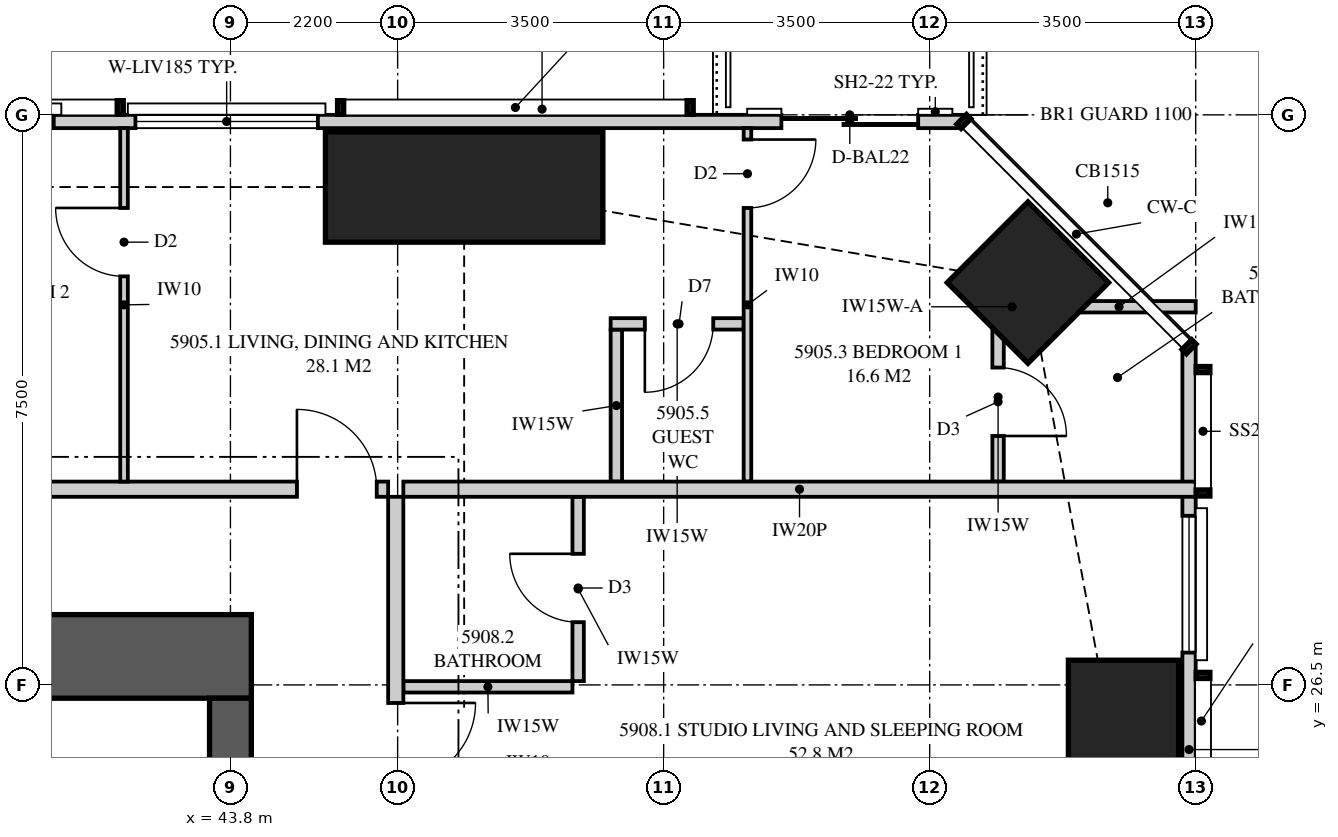
"""IFC4 building model, lengths in metres.
Left out: names, types, materials, properties, quantities, classifications, styles, units other than length and angle.
Written with IfcOpenShell. Run it as: python <this file> out.ifc"""

import sys

from ifc_helpers import new_model, si_unit, direction, frame, frame_2d, origin, origin_2d, place, context, subcontext, project, spatial, polyline, rectangle, hollow_rectangle, outline, extrude, element, fill, save


model = new_model("IFC4")
c1 = context("Model", 3, precision=1e-05, world=origin(), true_north=direction((0.0, 1.0)))
c2 = subcontext(c1, "Body", "Model", "MODEL_VIEW")
j1 = project(units=[si_unit("LENGTHUNIT", "METRE"), si_unit("PLANEANGLEUNIT", "RADIAN")], contexts=[c1])
p1 = place(None, origin())
s1 = spatial("IfcSite", under=j1, at=p1, CompositionType="ELEMENT")
p2 = place(p1, origin())
s2 = spatial("IfcBuilding", under=s1, at=p2, CompositionType="ELEMENT")
p3 = place(p2, frame((0.0, 0.0, 217.95)))
s3 = spatial("IfcBuildingStorey", under=s2, at=p3, CompositionType="ELEMENT", Elevation=217.95)
p4 = place(p3, frame((55.55, 25.0, 0.0), z_axis=(0.0, 0.0, 1.0), x_axis=(1.0, 0.0, 0.0)))
e1 = element("IfcColumn", 1, at=p4, inside=s3, PredefinedType="COLUMN", context=c2, shape_type="SweptSolid", body=[
    extrude(rectangle(XDim=1.45, YDim=3.65, at=origin_2d()), origin(), (0.0, 0.0, 1.0), 3.5),
])
p5 = place(p3, frame((54.293, 31.793, 0.0), z_axis=(0.0, 0.0, 1.0), x_axis=(-0.707106781187, -0.707106781187, 0.0)))
e2 = element("IfcColumn", 2, at=p5, inside=s3, PredefinedType="COLUMN", context=c2, shape_type="SweptSolid", body=[
    extrude(hollow_rectangle(XDim=1.5, YDim=1.5, WallThickness=0.125, at=origin_2d()), origin(), (0.0, 0.0, 1.0), 3.5),
])
p6 = place(p3, frame((46.875, 33.05, 0.0), z_axis=(0.0, 0.0, 1.0), x_axis=(0.0, 1.0, 0.0)))
e3 = element("IfcColumn", 3, at=p6, inside=s3, PredefinedType="COLUMN", context=c2, shape_type="SweptSolid", body=[
    extrude(rectangle(XDim=1.45, YDim=3.65, at=origin_2d()), origin(), (0.0, 0.0, 1.0), 3.5),
])
p7 = place(p3, frame((44.075, 26.875, 0.0), z_axis=(0.0, 0.0, 1.0), x_axis=(-1.0, 0.0, 0.0)))
e4 = element("IfcWall", 4, at=p7, inside=s3, PredefinedType="SHEAR", context=c2, shape_type="SweptSolid", body=[
    extrude(rectangle(XDim=8.175, YDim=1.1, at=frame_2d((4.087, 0.0))), origin(), (0.0, 0.0, 1.0), 3.5),
])
p8 = place(p7, frame((5.575, 0.0, 0.0)))
e5 = element("IfcOpeningElement", 5, at=p8, cuts=e4, PredefinedType="OPENING", context=c2, shape_type="SweptSolid", body=[
    extrude(rectangle(XDim=0.9, YDim=2.1, at=frame_2d((0.45, 1.05))), frame((0.0, 0.56, 0.0), z_axis=(0.0, -1.0, 0.0), x_axis=(1.0, 0.0, 0.0)), (0.0, 0.0, 1.0), 1.12),
])
p9 = place(p3, frame((43.8, 19.3, 0.0), z_axis=(0.0, 0.0, 1.0), x_axis=(0.0, 1.0, 0.0)))
e6 = element("IfcWall", 6, at=p9, inside=s3, PredefinedType="SHEAR", context=c2, shape_type="SweptSolid", body=[
    extrude(rectangle(XDim=7.025, YDim=0.55, at=frame_2d((3.512, 0.0))), origin(), (0.0, 0.0, 1.0), 3.5),
])
p10 = place(p3, frame((56.413, 20.35, 0.0), z_axis=(0.0, 0.0, 1.0), x_axis=(0.0, 1.0, 0.0)))
e7 = element("IfcWall", 7, at=p10, inside=s3, PredefinedType="SOLIDWALL", context=c2, shape_type="SweptSolid", body=[
    extrude(outline(polyline([(0.0, 0.0), (10.599, 0.0), (10.599, 3.26), (4.858, 3.26), (4.858, 2.3), (4.793, 2.3), (4.793, 3.26), (4.65, 3.26), (4.65, 2.3), (0.0, 2.3), (0.0, 0.0)])), frame((0.0, 0.087, 0.0), z_axis=(0.0, -1.0, 0.0), x_axis=(1.0, 0.0, 0.0)), (0.0, 0.0, 1.0), 0.175),
])
p11 = place(p10, frame((6.575, 0.0, 0.4)))
e8 = element("IfcOpeningElement", 8, at=p11, cuts=e7, PredefinedType="OPENING", context=c2, shape_type="SweptSolid", body=[
    extrude(rectangle(XDim=1.8, YDim=1.85, at=frame_2d((0.9, 0.925))), frame((0.0, 0.097, 0.0), z_axis=(0.0, -1.0, 0.0), x_axis=(1.0, 0.0, 0.0)), (0.0, 0.0, 1.0), 0.195),
])
p12 = place(p3, frame((53.449, 33.913, 0.0), z_axis=(0.0, 0.0, 1.0), x_axis=(-1.0, 0.0, 0.0)))
e9 = element("IfcWall", 9, at=p12, inside=s3, PredefinedType="SOLIDWALL", context=c2, shape_type="SweptSolid", body=[
    extrude(outline(polyline([(33.597, 0.0), (33.597, 3.26), (26.039, 3.26), (26.039, 2.3), (25.955, 2.3), (25.955, 3.26), (25.824, 3.26), (25.824, 2.3), (6.574, 2.3), (6.574, 3.26), (6.442, 3.26), (6.442, 2.3), (6.359, 2.3), (6.359, 3.26), (0.0, 3.26), (0.0, 0.0), (6.558, 0.0), (6.558, 0.159), (6.838, 0.302), (6.911, 0.302), (7.065, 0.0), (16.226, 0.0), (16.226, 0.178), (16.498, 0.331), (16.553, 0.331), (16.738, 0.0), (25.889, 0.0), (25.889, 0.201), (26.146, 0.358), (26.189, 0.358), (26.408, 0.0), (33.597, 0.0)])), frame((0.0, 0.087, 0.0), z_axis=(0.0, -1.0, 0.0), x_axis=(1.0, 0.0, 0.0)), (0.0, 0.0, 1.0), 0.175),
])
p13 = place(p12, frame((0.6, 0.0, 0.0)))
e10 = element("IfcOpeningElement", 10, at=p13, cuts=e9, PredefinedType="OPENING", context=c2, shape_type="SweptSolid", body=[
    extrude(rectangle(XDim=1.8, YDim=2.25, at=frame_2d((0.9, 1.125))), frame((0.0, 0.097, 0.0), z_axis=(0.0, -1.0, 0.0), x_axis=(1.0, 0.0, 0.0)), (0.0, 0.0, 1.0), 0.195),
])
p14 = place(p12, frame((8.499, 0.0, 0.4)))
e11 = element("IfcOpeningElement", 11, at=p14, cuts=e9, PredefinedType="OPENING", context=c2, shape_type="SweptSolid", body=[
    extrude(rectangle(XDim=2.4, YDim=1.85, at=frame_2d((1.2, 0.925))), frame((0.0, 0.097, 0.0), z_axis=(0.0, -1.0, 0.0), x_axis=(1.0, 0.0, 0.0)), (0.0, 0.0, 1.0), 0.195),
])
p15 = place(p12, frame((11.974, 0.0, 0.4)))
e12 = element("IfcOpeningElement", 12, at=p15, cuts=e9, PredefinedType="OPENING", context=c2, shape_type="SweptSolid", body=[
    extrude(rectangle(XDim=1.8, YDim=1.85, at=frame_2d((0.9, 0.925))), frame((0.0, 0.097, 0.0), z_axis=(0.0, -1.0, 0.0), x_axis=(1.0, 0.0, 0.0)), (0.0, 0.0, 1.0), 0.195),
])
p16 = place(p12, frame((18.124, 0.0, 0.4)))
e13 = element("IfcOpeningElement", 13, at=p16, cuts=e9, PredefinedType="OPENING", context=c2, shape_type="SweptSolid", body=[
    extrude(rectangle(XDim=1.8, YDim=1.85, at=frame_2d((0.9, 0.925))), frame((0.0, 0.097, 0.0), z_axis=(0.0, -1.0, 0.0), x_axis=(1.0, 0.0, 0.0)), (0.0, 0.0, 1.0), 0.195),
])
p17 = place(p12, frame((21.249, 0.0, 0.4)))
e14 = element("IfcOpeningElement", 14, at=p17, cuts=e9, PredefinedType="OPENING", context=c2, shape_type="SweptSolid", body=[
    extrude(rectangle(XDim=1.8, YDim=1.85, at=frame_2d((0.9, 0.925))), frame((0.0, 0.097, 0.0), z_axis=(0.0, -1.0, 0.0), x_axis=(1.0, 0.0, 0.0)), (0.0, 0.0, 1.0), 0.195),
])
p18 = place(p12, frame((27.76, 0.0, 0.4)))
e15 = element("IfcOpeningElement", 15, at=p18, cuts=e9, PredefinedType="OPENING", context=c2, shape_type="SweptSolid", body=[
    extrude(rectangle(XDim=2.4, YDim=1.85, at=frame_2d((1.2, 0.925))), frame((0.0, 0.097, 0.0), z_axis=(0.0, -1.0, 0.0), x_axis=(1.0, 0.0, 0.0)), (0.0, 0.0, 1.0), 0.195),
])
p19 = place(p3, frame((38.8, 29.075, 0.0), z_axis=(0.0, 0.0, 1.0), x_axis=(1.0, 0.0, 0.0)))
e16 = element("IfcWall", 16, at=p19, inside=s3, PredefinedType="PARTITIONING", context=c2, shape_type="SweptSolid", body=[
    extrude(outline(polyline([(0.0, 0.0), (7.075, 0.0), (7.075, 3.26), (7.075, 2.66), (6.765, 2.66), (6.765, 3.26), (0.0, 3.26), (0.0, 0.0)])), frame((0.0, 0.1, 0.0), z_axis=(0.0, -1.0, 0.0), x_axis=(1.0, 0.0, 0.0)), (0.0, 0.0, 1.0), 0.2),
])
p20 = place(p19, frame((5.875, 0.0, 0.0)))
e17 = element("IfcOpeningElement", 17, at=p20, cuts=e16, PredefinedType="OPENING", context=c2, shape_type="SweptSolid", body=[
    extrude(rectangle(XDim=1.05, YDim=2.2, at=frame_2d((0.525, 1.1))), frame((0.0, 0.11, 0.0), z_axis=(0.0, -1.0, 0.0), x_axis=(1.0, 0.0, 0.0)), (0.0, 0.0, 1.0), 0.22),
])
p21 = place(p3, frame((53.975, 31.475, 0.0), z_axis=(0.0, 0.0, 1.0), x_axis=(1.0, 0.0, 0.0)))
e18 = element("IfcWall", 18, at=p21, inside=s3, PredefinedType="PLUMBINGWALL", context=c2, shape_type="SweptSolid", body=[
    extrude(outline(polyline([(0.217, 2.3), (0.0, 2.3), (0.0, 0.521), (0.217, 0.442), (0.217, 2.3)])), frame((0.0, 0.075, 0.0), z_axis=(0.0, -1.0, 0.0), x_axis=(1.0, 0.0, 0.0)), (0.0, 0.0, 1.0), 0.15),
])
p22 = place(p3, frame((54.482, 31.475, 0.0), z_axis=(0.0, 0.0, 1.0), x_axis=(1.0, 0.0, 0.0)))
e19 = element("IfcWall", 19, at=p22, inside=s3, PredefinedType="PLUMBINGWALL", context=c2, shape_type="SweptSolid", body=[
    extrude(outline(polyline([(0.77, 3.26), (0.77, 2.3), (0.412, 2.3), (0.397, 2.214), (0.0, 1.075), (0.295, 0.229), (0.815, 0.04), (0.815, 0.0), (2.018, 0.0), (2.018, 3.26), (0.77, 3.26)])), frame((0.0, 0.075, 0.0), z_axis=(0.0, -1.0, 0.0), x_axis=(1.0, 0.0, 0.0)), (0.0, 0.0, 1.0), 0.15),
])
p23 = place(p3, frame((53.9, 31.4, 0.0), z_axis=(0.0, 0.0, 1.0), x_axis=(0.0, -1.0, 0.0)))
e20 = element("IfcWall", 20, at=p23, inside=s3, PredefinedType="PLUMBINGWALL", context=c2, shape_type="SweptSolid", body=[
    extrude(outline(polyline([(2.225, 2.3), (0.0, 2.3), (0.0, 0.548), (0.199, 0.51), (0.355, 0.425), (0.418, 0.0), (2.225, 0.0), (2.225, 2.3)])), frame((0.0, 0.075, 0.0), z_axis=(0.0, -1.0, 0.0), x_axis=(1.0, 0.0, 0.0)), (0.0, 0.0, 1.0), 0.15),
])
p24 = place(p23, frame((0.725, 0.0, 0.0)))
e21 = element("IfcOpeningElement", 21, at=p24, cuts=e20, PredefinedType="OPENING", context=c2, shape_type="SweptSolid", body=[
    extrude(rectangle(XDim=0.9, YDim=2.1, at=frame_2d((0.45, 1.05))), frame((0.0, 0.085, 0.0), z_axis=(0.0, -1.0, 0.0), x_axis=(1.0, 0.0, 0.0)), (0.0, 0.0, 1.0), 0.17),
])
p25 = place(p3, frame((50.603, 33.825, 0.0), z_axis=(0.0, 0.0, 1.0), x_axis=(0.0, -1.0, 0.0)))
e22 = element("IfcWall", 22, at=p25, inside=s3, PredefinedType="PARTITIONING", context=c2, shape_type="SweptSolid", body=[
    extrude(outline(polyline([(0.0, 0.0), (4.65, 0.0), (4.65, 3.26), (2.279, 3.26), (2.279, 2.3), (0.534, 2.3), (0.534, 3.26), (0.0, 3.26), (0.0, 0.0)])), frame((0.0, 0.05, 0.0), z_axis=(0.0, -1.0, 0.0), x_axis=(1.0, 0.0, 0.0)), (0.0, 0.0, 1.0), 0.1),
])
p26 = place(p25, frame((0.15, 0.0, 0.0)))
e23 = element("IfcOpeningElement", 23, at=p26, cuts=e22, PredefinedType="OPENING", context=c2, shape_type="SweptSolid", body=[
    extrude(rectangle(XDim=0.9, YDim=2.1, at=frame_2d((0.45, 1.05))), frame((0.0, 0.06, 0.0), z_axis=(0.0, -1.0, 0.0), x_axis=(1.0, 0.0, 0.0)), (0.0, 0.0, 1.0), 0.12),
])
p27 = place(p3, frame((42.4, 33.825, 0.0), z_axis=(0.0, 0.0, 1.0), x_axis=(0.0, -1.0, 0.0)))
e24 = element("IfcWall", 24, at=p27, inside=s3, PredefinedType="PARTITIONING", context=c2, shape_type="SweptSolid", body=[
    extrude(outline(polyline([(0.0, 0.0), (4.65, 0.0), (4.65, 3.26), (1.635, 3.26), (1.635, 2.3), (0.0, 2.3), (0.0, 3.26), (0.0, 0.0)])), frame((0.0, 0.05, 0.0), z_axis=(0.0, -1.0, 0.0), x_axis=(1.0, 0.0, 0.0)), (0.0, 0.0, 1.0), 0.1),
])
p28 = place(p27, frame((1.05, 0.0, 0.0)))
e25 = element("IfcOpeningElement", 25, at=p28, cuts=e24, PredefinedType="OPENING", context=c2, shape_type="SweptSolid", body=[
    extrude(rectangle(XDim=0.9, YDim=2.1, at=frame_2d((0.45, 1.05))), frame((0.0, 0.06, 0.0), z_axis=(0.0, -1.0, 0.0), x_axis=(1.0, 0.0, 0.0)), (0.0, 0.0, 1.0), 0.12),
])
p29 = place(p3, frame((46.075, 29.075, 0.0), z_axis=(0.0, 0.0, 1.0), x_axis=(1.0, 0.0, 0.0)))
e26 = element("IfcWall", 26, at=p29, inside=s3, PredefinedType="PARTITIONING", context=c2, shape_type="SweptSolid", body=[
    extrude(outline(polyline([(0.0, 0.0), (10.425, 0.0), (10.425, 3.26), (9.646, 3.26), (9.646, 2.3), (7.795, 2.3), (7.795, 3.26), (2.11, 3.26), (2.11, 2.66), (0.0, 2.66), (0.0, 3.26), (0.0, 0.0)])), frame((0.0, 0.1, 0.0), z_axis=(0.0, -1.0, 0.0), x_axis=(1.0, 0.0, 0.0)), (0.0, 0.0, 1.0), 0.2),
])
p30 = place(p3, frame((45.975, 25.0, 0.0), z_axis=(0.0, 0.0, 1.0), x_axis=(0.0, 1.0, 0.0)))
e27 = element("IfcWall", 27, at=p30, inside=s3, PredefinedType="PARTITIONING", context=c2, shape_type="SweptSolid", body=[
    extrude(rectangle(XDim=3.975, YDim=0.2, at=frame_2d((1.988, 0.0))), origin(), (0.0, 0.0, 1.0), 2.66),
])
p31 = place(p30, frame((0.212, 0.0, 0.0)))
e28 = element("IfcOpeningElement", 28, at=p31, cuts=e27, PredefinedType="OPENING", context=c2, shape_type="SweptSolid", body=[
    extrude(rectangle(XDim=1.05, YDim=2.2, at=frame_2d((0.525, 1.1))), frame((0.0, 0.11, 0.0), z_axis=(0.0, -1.0, 0.0), x_axis=(1.0, 0.0, 0.0)), (0.0, 0.0, 1.0), 0.22),
])
p32 = place(p3, frame((48.375, 26.55, 0.0), z_axis=(0.0, 0.0, 1.0), x_axis=(0.0, 1.0, 0.0)))
e29 = element("IfcWall", 29, at=p32, inside=s3, PredefinedType="PLUMBINGWALL", context=c2, shape_type="SweptSolid", body=[
    extrude(rectangle(XDim=2.425, YDim=0.15, at=frame_2d((1.212, 0.0))), origin(), (0.0, 0.0, 1.0), 3.26),
])
p33 = place(p32, frame((0.775, 0.0, 0.0)))
e30 = element("IfcOpeningElement", 30, at=p33, cuts=e29, PredefinedType="OPENING", context=c2, shape_type="SweptSolid", body=[
    extrude(rectangle(XDim=0.9, YDim=2.1, at=frame_2d((0.45, 1.05))), frame((0.0, 0.085, 0.0), z_axis=(0.0, -1.0, 0.0), x_axis=(1.0, 0.0, 0.0)), (0.0, 0.0, 1.0), 0.17),
])
p34 = place(p3, frame((48.3, 26.475, 0.0), z_axis=(0.0, 0.0, 1.0), x_axis=(-1.0, 0.0, 0.0)))
e31 = element("IfcWall", 31, at=p34, inside=s3, PredefinedType="PLUMBINGWALL", context=c2, shape_type="SweptSolid", body=[
    extrude(outline(polyline([(0.0, 0.0), (2.225, 0.0), (2.225, 3.26), (2.225, 2.66), (0.14, 2.66), (0.14, 3.26), (0.0, 3.26), (0.0, 0.0)])), frame((0.0, 0.075, 0.0), z_axis=(0.0, -1.0, 0.0), x_axis=(1.0, 0.0, 0.0)), (0.0, 0.0, 1.0), 0.15),
])
p35 = place(p3, frame((50.552, 31.25, 0.0), z_axis=(0.0, 0.0, 1.0), x_axis=(-1.0, 0.0, 0.0)))
e32 = element("IfcWall", 32, at=p35, inside=s3, PredefinedType="PLUMBINGWALL", context=c2, shape_type="SweptSolid", body=[
    extrude(rectangle(XDim=1.75, YDim=0.15, at=frame_2d((0.875, 0.0))), origin(), (0.0, 0.0, 1.0), 3.26),
])
p36 = place(p35, frame((0.4, 0.0, 0.0)))
e33 = element("IfcOpeningElement", 33, at=p36, cuts=e32, PredefinedType="OPENING", context=c2, shape_type="SweptSolid", body=[
    extrude(rectangle(XDim=0.9, YDim=2.1, at=frame_2d((0.45, 1.05))), frame((0.0, 0.085, 0.0), z_axis=(0.0, -1.0, 0.0), x_axis=(1.0, 0.0, 0.0)), (0.0, 0.0, 1.0), 0.17),
])
p37 = place(p3, frame((48.877, 29.175, 0.0), z_axis=(0.0, 0.0, 1.0), x_axis=(0.0, 1.0, 0.0)))
e34 = element("IfcWall", 34, at=p37, inside=s3, PredefinedType="PLUMBINGWALL", context=c2, shape_type="SweptSolid", body=[
    extrude(rectangle(XDim=2.0, YDim=0.15, at=frame_2d((1.0, 0.0))), origin(), (0.0, 0.0, 1.0), 3.26),
])
p38 = place(p11, origin())
e35 = element("IfcWindow", 35, at=p38, inside=s3, PartitioningType="SINGLE_PANEL", PredefinedType="WINDOW", context=c2, shape_type="SweptSolid", body=[
    extrude(rectangle(XDim=1.8, YDim=1.85, at=frame_2d((0.9, 0.925))), frame((0.0, 0.03, 0.0), z_axis=(0.0, -1.0, 0.0), x_axis=(1.0, 0.0, 0.0)), (0.0, 0.0, 1.0), 0.06),
])
fill(e8, e35)
p39 = place(p13, origin())
e36 = element("IfcDoor", 36, at=p39, inside=s3, OperationType="SLIDING_TO_LEFT", PredefinedType="DOOR", context=c2, shape_type="SweptSolid", body=[
    extrude(rectangle(XDim=1.8, YDim=2.25, at=frame_2d((0.9, 1.125))), frame((0.0, 0.025, 0.0), z_axis=(0.0, -1.0, 0.0), x_axis=(1.0, 0.0, 0.0)), (0.0, 0.0, 1.0), 0.05),
])
fill(e10, e36)
p40 = place(p14, origin())
e37 = element("IfcWindow", 37, at=p40, inside=s3, PartitioningType="SINGLE_PANEL", PredefinedType="WINDOW", context=c2, shape_type="SweptSolid", body=[
    extrude(rectangle(XDim=2.4, YDim=1.85, at=frame_2d((1.2, 0.925))), frame((0.0, 0.03, 0.0), z_axis=(0.0, -1.0, 0.0), x_axis=(1.0, 0.0, 0.0)), (0.0, 0.0, 1.0), 0.06),
])
fill(e11, e37)
p41 = place(p15, origin())
e38 = element("IfcWindow", 38, at=p41, inside=s3, PartitioningType="SINGLE_PANEL", PredefinedType="WINDOW", context=c2, shape_type="SweptSolid", body=[
    extrude(rectangle(XDim=1.8, YDim=1.85, at=frame_2d((0.9, 0.925))), frame((0.0, 0.03, 0.0), z_axis=(0.0, -1.0, 0.0), x_axis=(1.0, 0.0, 0.0)), (0.0, 0.0, 1.0), 0.06),
])
fill(e12, e38)
p42 = place(p20, origin())
e39 = element("IfcDoor", 39, at=p42, inside=s3, OperationType="SINGLE_SWING_LEFT", PredefinedType="DOOR", context=c2, shape_type="SweptSolid", body=[
    extrude(rectangle(XDim=1.05, YDim=2.2, at=frame_2d((0.525, 1.1))), frame((0.0, 0.025, 0.0), z_axis=(0.0, -1.0, 0.0), x_axis=(1.0, 0.0, 0.0)), (0.0, 0.0, 1.0), 0.05),
])
fill(e17, e39)
p43 = place(p24, origin())
e40 = element("IfcDoor", 40, at=p43, inside=s3, OperationType="SINGLE_SWING_RIGHT", PredefinedType="DOOR", context=c2, shape_type="SweptSolid", body=[
    extrude(rectangle(XDim=0.9, YDim=2.1, at=frame_2d((0.45, 1.05))), frame((0.0, 0.025, 0.0), z_axis=(0.0, -1.0, 0.0), x_axis=(1.0, 0.0, 0.0)), (0.0, 0.0, 1.0), 0.05),
])
fill(e21, e40)
p44 = place(p26, origin())
e41 = element("IfcDoor", 41, at=p44, inside=s3, OperationType="SINGLE_SWING_LEFT", PredefinedType="DOOR", context=c2, shape_type="SweptSolid", body=[
    extrude(rectangle(XDim=0.9, YDim=2.1, at=frame_2d((0.45, 1.05))), frame((0.0, 0.025, 0.0), z_axis=(0.0, -1.0, 0.0), x_axis=(1.0, 0.0, 0.0)), (0.0, 0.0, 1.0), 0.05),
])
fill(e23, e41)
p45 = place(p28, frame((0.9, 0.0, 0.0), z_axis=(0.0, 0.0, 1.0), x_axis=(-1.0, 0.0, 0.0)))
e42 = element("IfcDoor", 42, at=p45, inside=s3, OperationType="SINGLE_SWING_RIGHT", PredefinedType="DOOR", context=c2, shape_type="SweptSolid", body=[
    extrude(rectangle(XDim=0.9, YDim=2.1, at=frame_2d((0.45, 1.05))), frame((0.0, 0.025, 0.0), z_axis=(0.0, -1.0, 0.0), x_axis=(1.0, 0.0, 0.0)), (0.0, 0.0, 1.0), 0.05),
])
fill(e25, e42)
p46 = place(p31, frame((1.05, 0.0, 0.0), z_axis=(0.0, 0.0, 1.0), x_axis=(-1.0, 0.0, 0.0)))
e43 = element("IfcDoor", 43, at=p46, inside=s3, OperationType="SINGLE_SWING_LEFT", PredefinedType="DOOR", context=c2, shape_type="SweptSolid", body=[
    extrude(rectangle(XDim=1.05, YDim=2.2, at=frame_2d((0.525, 1.1))), frame((0.0, 0.025, 0.0), z_axis=(0.0, -1.0, 0.0), x_axis=(1.0, 0.0, 0.0)), (0.0, 0.0, 1.0), 0.05),
])
fill(e28, e43)
p47 = place(p33, origin())
e44 = element("IfcDoor", 44, at=p47, inside=s3, OperationType="SINGLE_SWING_RIGHT", PredefinedType="DOOR", context=c2, shape_type="SweptSolid", body=[
    extrude(rectangle(XDim=0.9, YDim=2.1, at=frame_2d((0.45, 1.05))), frame((0.0, 0.025, 0.0), z_axis=(0.0, -1.0, 0.0), x_axis=(1.0, 0.0, 0.0)), (0.0, 0.0, 1.0), 0.05),
])
fill(e30, e44)
p48 = place(p36, origin())
e45 = element("IfcDoor", 45, at=p48, inside=s3, OperationType="SINGLE_SWING_RIGHT", PredefinedType="DOOR", context=c2, shape_type="SweptSolid", body=[
    extrude(rectangle(XDim=0.9, YDim=2.1, at=frame_2d((0.45, 1.05))), frame((0.0, 0.025, 0.0), z_axis=(0.0, -1.0, 0.0), x_axis=(1.0, 0.0, 0.0)), (0.0, 0.0, 1.0), 0.05),
])
fill(e33, e45)
save(model, sys.argv[1])
